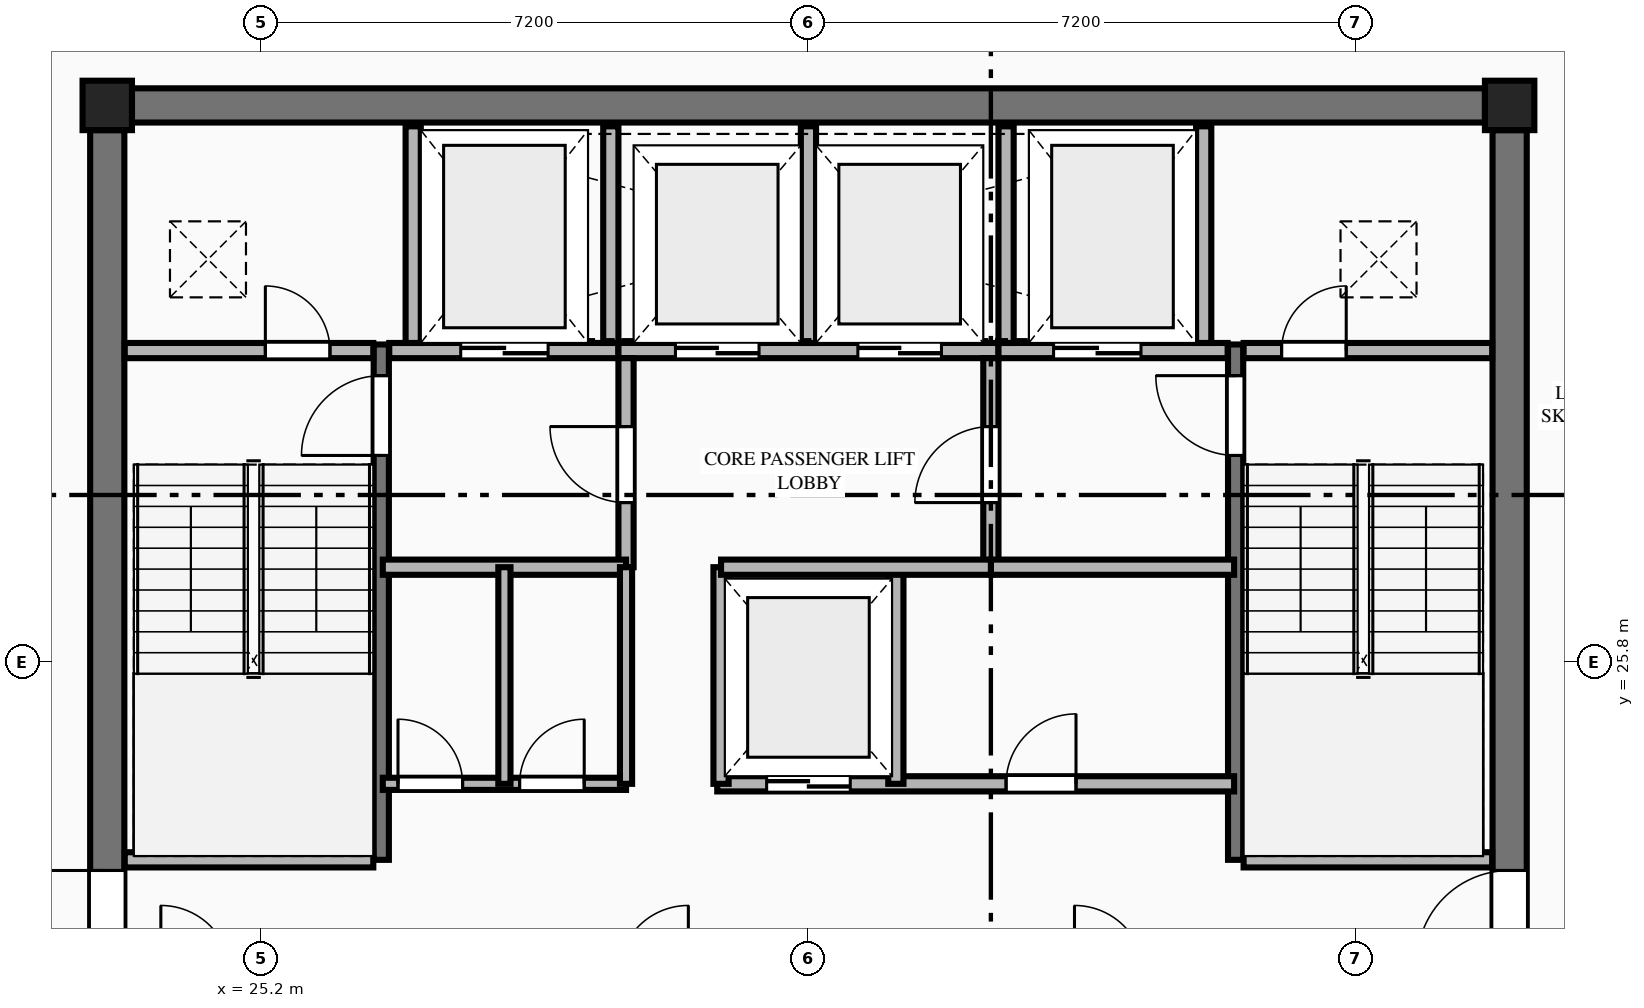
"""IFC4 building model, lengths in metres.
Left out: names, types, materials, properties, quantities, classifications, styles, units other than length and angle.
Written with IfcOpenShell. Run it as: python <this file> out.ifc"""

import sys

from ifc_helpers import new_model, si_unit, direction, frame, frame_2d, origin, origin_2d, place, context, subcontext, project, spatial, rectangle, extrude, element, fill, save


model = new_model("IFC4")
c1 = context("Model", 3, precision=1e-05, world=origin(), true_north=direction((0.0, 1.0)))
c2 = subcontext(c1, "Body", "Model", "MODEL_VIEW")
j1 = project(units=[si_unit("LENGTHUNIT", "METRE"), si_unit("PLANEANGLEUNIT", "RADIAN")], contexts=[c1])
p1 = place(None, origin())
s1 = spatial("IfcSite", under=j1, at=p1, CompositionType="ELEMENT")
p2 = place(p1, origin())
s2 = spatial("IfcBuilding", under=s1, at=p2, CompositionType="ELEMENT")
p3 = place(p2, frame((0.0, 0.0, 237.95)))
s3 = spatial("IfcBuildingStorey", under=s2, at=p3, CompositionType="ELEMENT", Elevation=237.95)
for number, where, z_axis, x_axis in (
    (1, (41.625, 33.125, 0.0), (0.0, 0.0, 1.0), (1.0, 0.0, 0.0)),
    (2, (23.175, 33.125, 0.0), (0.0, 0.0, 1.0), (1.0, 0.0, 0.0)),
):
    element("IfcColumn", number, at=place(p3, frame(where, z_axis=z_axis, x_axis=x_axis)), inside=s3, PredefinedType="COLUMN", context=c2, shape_type="SweptSolid", body=[
        extrude(rectangle(XDim=0.65, YDim=0.65, at=origin_2d()), origin(), (0.0, 0.0, 1.0), 3.65),
    ])
p4 = place(p3, frame((23.5, 33.125, 0.0), z_axis=(0.0, 0.0, 1.0), x_axis=(1.0, 0.0, 0.0)))
e3 = element("IfcWall", 3, at=p4, inside=s3, PredefinedType="SHEAR", context=c2, shape_type="SweptSolid", body=[
    extrude(rectangle(XDim=17.8, YDim=0.45, at=frame_2d((8.9, 0.0))), origin(), (0.0, 0.0, 1.0), 3.45),
])
p5 = place(p3, frame((23.175, 19.0, 0.0), z_axis=(0.0, 0.0, 1.0), x_axis=(0.0, 1.0, 0.0)))
e4 = element("IfcWall", 4, at=p5, inside=s3, PredefinedType="SHEAR", context=c2, shape_type="SweptSolid", body=[
    extrude(rectangle(XDim=13.8, YDim=0.45, at=frame_2d((6.9, 0.0))), origin(), (0.0, 0.0, 1.0), 3.45),
])
p6 = place(p5, frame((2.84, 0.0, 0.0)))
e5 = element("IfcOpeningElement", 5, at=p6, cuts=e4, PredefinedType="OPENING", context=c2, shape_type="SweptSolid", body=[
    extrude(rectangle(XDim=1.22, YDim=2.25, at=frame_2d((0.61, 1.125))), frame((0.0, 0.235, 0.0), z_axis=(0.0, -1.0, 0.0), x_axis=(1.0, 0.0, 0.0)), (0.0, 0.0, 1.0), 0.47),
])
p7 = place(p3, frame((41.625, 19.0, 0.0), z_axis=(0.0, 0.0, 1.0), x_axis=(0.0, 1.0, 0.0)))
e6 = element("IfcWall", 6, at=p7, inside=s3, PredefinedType="SHEAR", context=c2, shape_type="SweptSolid", body=[
    extrude(rectangle(XDim=13.8, YDim=0.45, at=frame_2d((6.9, 0.0))), origin(), (0.0, 0.0, 1.0), 3.45),
])
p8 = place(p7, frame((2.84, 0.0, 0.0)))
e7 = element("IfcOpeningElement", 7, at=p8, cuts=e6, PredefinedType="OPENING", context=c2, shape_type="SweptSolid", body=[
    extrude(rectangle(XDim=1.22, YDim=2.25, at=frame_2d((0.61, 1.125))), frame((0.0, 0.235, 0.0), z_axis=(0.0, -1.0, 0.0), x_axis=(1.0, 0.0, 0.0)), (0.0, 0.0, 1.0), 0.47),
])
p9 = place(p3, frame((26.78, 23.2, 0.0), z_axis=(0.0, 0.0, 1.0), x_axis=(0.0, 1.0, 0.0)))
e8 = element("IfcWall", 8, at=p9, inside=s3, PredefinedType="SHEAR", context=c2, shape_type="SweptSolid", body=[
    extrude(rectangle(XDim=6.78, YDim=0.2, at=frame_2d((3.39, 0.0))), origin(), (0.0, 0.0, 1.0), 3.65),
])
p10 = place(p9, frame((5.32, 0.0, 0.0)))
e9 = element("IfcOpeningElement", 9, at=p10, cuts=e8, PredefinedType="OPENING", context=c2, shape_type="SweptSolid", body=[
    extrude(rectangle(XDim=1.05, YDim=2.15, at=frame_2d((0.525, 1.075))), frame((0.0, 0.11, 0.0), z_axis=(0.0, -1.0, 0.0), x_axis=(1.0, 0.0, 0.0)), (0.0, 0.0, 1.0), 0.22),
])
p11 = place(p3, frame((23.405, 23.2, 0.0), z_axis=(0.0, 0.0, 1.0), x_axis=(1.0, 0.0, 0.0)))
e10 = element("IfcWall", 10, at=p11, inside=s3, PredefinedType="PLUMBINGWALL", context=c2, shape_type="SweptSolid", body=[
    extrude(rectangle(XDim=3.27, YDim=0.2, at=frame_2d((1.635, 0.0))), origin(), (0.0, 0.0, 1.0), 3.45),
])
p12 = place(p3, frame((38.02, 23.2, 0.0), z_axis=(0.0, 0.0, 1.0), x_axis=(0.0, 1.0, 0.0)))
e11 = element("IfcWall", 11, at=p12, inside=s3, PredefinedType="SHEAR", context=c2, shape_type="SweptSolid", body=[
    extrude(rectangle(XDim=6.78, YDim=0.2, at=frame_2d((3.39, 0.0))), origin(), (0.0, 0.0, 1.0), 3.65),
])
p13 = place(p12, frame((5.32, 0.0, 0.0)))
e12 = element("IfcOpeningElement", 12, at=p13, cuts=e11, PredefinedType="OPENING", context=c2, shape_type="SweptSolid", body=[
    extrude(rectangle(XDim=1.05, YDim=2.15, at=frame_2d((0.525, 1.075))), frame((0.0, 0.11, 0.0), z_axis=(0.0, -1.0, 0.0), x_axis=(1.0, 0.0, 0.0)), (0.0, 0.0, 1.0), 0.22),
])
p14 = place(p3, frame((38.125, 23.2, 0.0), z_axis=(0.0, 0.0, 1.0), x_axis=(1.0, 0.0, 0.0)))
e13 = element("IfcWall", 13, at=p14, inside=s3, PredefinedType="PLUMBINGWALL", context=c2, shape_type="SweptSolid", body=[
    extrude(rectangle(XDim=3.27, YDim=0.2, at=frame_2d((1.635, 0.0))), origin(), (0.0, 0.0, 1.0), 3.45),
])
p15 = place(p3, frame((23.405, 29.9, 0.0), z_axis=(0.0, 0.0, 1.0), x_axis=(1.0, 0.0, 0.0)))
e14 = element("IfcWall", 14, at=p15, inside=s3, PredefinedType="PLUMBINGWALL", context=c2, shape_type="SweptSolid", body=[
    extrude(rectangle(XDim=3.27, YDim=0.2, at=frame_2d((1.635, 0.0))), origin(), (0.0, 0.0, 1.0), 3.45),
])
p16 = place(p15, frame((1.85, 0.0, 0.0)))
e15 = element("IfcOpeningElement", 15, at=p16, cuts=e14, PredefinedType="OPENING", context=c2, shape_type="SweptSolid", body=[
    extrude(rectangle(XDim=0.85, YDim=2.05, at=frame_2d((0.425, 1.025))), frame((0.0, 0.11, 0.0), z_axis=(0.0, -1.0, 0.0), x_axis=(1.0, 0.0, 0.0)), (0.0, 0.0, 1.0), 0.22),
])
p17 = place(p3, frame((26.885, 29.9, 0.0), z_axis=(0.0, 0.0, 1.0), x_axis=(1.0, 0.0, 0.0)))
e16 = element("IfcWall", 16, at=p17, inside=s3, PredefinedType="PLUMBINGWALL", context=c2, shape_type="SweptSolid", body=[
    extrude(rectangle(XDim=3.015, YDim=0.2, at=frame_2d((1.507, 0.0))), origin(), (0.0, 0.0, 1.0), 3.45),
])
p18 = place(p17, frame((0.94, 0.0, 0.0)))
e17 = element("IfcOpeningElement", 17, at=p18, cuts=e16, PredefinedType="OPENING", context=c2, shape_type="SweptSolid", body=[
    extrude(rectangle(XDim=1.15, YDim=2.2, at=frame_2d((0.575, 1.1))), frame((0.0, 0.11, 0.0), z_axis=(0.0, -1.0, 0.0), x_axis=(1.0, 0.0, 0.0)), (0.0, 0.0, 1.0), 0.22),
])
p19 = place(p3, frame((29.9, 29.9, 0.0), z_axis=(0.0, 0.0, 1.0), x_axis=(1.0, 0.0, 0.0)))
e18 = element("IfcWall", 18, at=p19, inside=s3, PredefinedType="PLUMBINGWALL", context=c2, shape_type="SweptSolid", body=[
    extrude(rectangle(XDim=5.0, YDim=0.2, at=frame_2d((2.5, 0.0))), origin(), (0.0, 0.0, 1.0), 3.45),
])
p20 = place(p19, frame((0.75, 0.0, 0.0)))
e19 = element("IfcOpeningElement", 19, at=p20, cuts=e18, PredefinedType="OPENING", context=c2, shape_type="SweptSolid", body=[
    extrude(rectangle(XDim=1.1, YDim=2.2, at=frame_2d((0.55, 1.1))), frame((0.0, 0.11, 0.0), z_axis=(0.0, -1.0, 0.0), x_axis=(1.0, 0.0, 0.0)), (0.0, 0.0, 1.0), 0.22),
])
p21 = place(p19, frame((3.15, 0.0, 0.0)))
e20 = element("IfcOpeningElement", 20, at=p21, cuts=e18, PredefinedType="OPENING", context=c2, shape_type="SweptSolid", body=[
    extrude(rectangle(XDim=1.1, YDim=2.2, at=frame_2d((0.55, 1.1))), frame((0.0, 0.11, 0.0), z_axis=(0.0, -1.0, 0.0), x_axis=(1.0, 0.0, 0.0)), (0.0, 0.0, 1.0), 0.22),
])
p22 = place(p3, frame((34.9, 29.9, 0.0), z_axis=(0.0, 0.0, 1.0), x_axis=(1.0, 0.0, 0.0)))
e21 = element("IfcWall", 21, at=p22, inside=s3, PredefinedType="PLUMBINGWALL", context=c2, shape_type="SweptSolid", body=[
    extrude(rectangle(XDim=3.015, YDim=0.2, at=frame_2d((1.508, 0.0))), origin(), (0.0, 0.0, 1.0), 3.45),
])
p23 = place(p22, frame((0.725, 0.0, 0.0)))
e22 = element("IfcOpeningElement", 22, at=p23, cuts=e21, PredefinedType="OPENING", context=c2, shape_type="SweptSolid", body=[
    extrude(rectangle(XDim=1.15, YDim=2.2, at=frame_2d((0.575, 1.1))), frame((0.0, 0.11, 0.0), z_axis=(0.0, -1.0, 0.0), x_axis=(1.0, 0.0, 0.0)), (0.0, 0.0, 1.0), 0.22),
])
p24 = place(p3, frame((38.125, 29.9, 0.0), z_axis=(0.0, 0.0, 1.0), x_axis=(1.0, 0.0, 0.0)))
e23 = element("IfcWall", 23, at=p24, inside=s3, PredefinedType="PLUMBINGWALL", context=c2, shape_type="SweptSolid", body=[
    extrude(rectangle(XDim=3.27, YDim=0.2, at=frame_2d((1.635, 0.0))), origin(), (0.0, 0.0, 1.0), 3.45),
])
p25 = place(p24, frame((0.5, 0.0, 0.0)))
e24 = element("IfcOpeningElement", 24, at=p25, cuts=e23, PredefinedType="OPENING", context=c2, shape_type="SweptSolid", body=[
    extrude(rectangle(XDim=0.85, YDim=2.05, at=frame_2d((0.425, 1.025))), frame((0.0, 0.11, 0.0), z_axis=(0.0, -1.0, 0.0), x_axis=(1.0, 0.0, 0.0)), (0.0, 0.0, 1.0), 0.22),
])
for number, where, z_axis, x_axis in (
    (25, (27.2, 30.0, 0.0), (0.0, 0.0, 1.0), (0.0, 1.0, 0.0)),
    (26, (29.8, 30.0, 0.0), (0.0, 0.0, 1.0), (0.0, 1.0, 0.0)),
    (27, (32.4, 30.0, 0.0), (0.0, 0.0, 1.0), (0.0, 1.0, 0.0)),
    (28, (35.0, 30.0, 0.0), (0.0, 0.0, 1.0), (0.0, 1.0, 0.0)),
    (29, (37.6, 30.0, 0.0), (0.0, 0.0, 1.0), (0.0, 1.0, 0.0)),
):
    element("IfcWall", number, at=place(p3, frame(where, z_axis=z_axis, x_axis=x_axis)), inside=s3, PredefinedType="PLUMBINGWALL", context=c2, shape_type="SweptSolid", body=[
        extrude(rectangle(XDim=2.85, YDim=0.2, at=frame_2d((1.425, 0.0))), origin(), (0.0, 0.0, 1.0), 3.45),
    ])
p26 = place(p3, frame((30.0, 27.05, 0.0), z_axis=(0.0, 0.0, 1.0), x_axis=(0.0, 1.0, 0.0)))
e30 = element("IfcWall", 30, at=p26, inside=s3, PredefinedType="PLUMBINGWALL", context=c2, shape_type="SweptSolid", body=[
    extrude(rectangle(XDim=2.75, YDim=0.2, at=frame_2d((1.375, 0.0))), origin(), (0.0, 0.0, 1.0), 3.45),
])
p27 = place(p26, frame((0.85, 0.0, 0.0)))
e31 = element("IfcOpeningElement", 31, at=p27, cuts=e30, PredefinedType="OPENING", context=c2, shape_type="SweptSolid", body=[
    extrude(rectangle(XDim=1.0, YDim=2.15, at=frame_2d((0.5, 1.075))), frame((0.0, 0.11, 0.0), z_axis=(0.0, -1.0, 0.0), x_axis=(1.0, 0.0, 0.0)), (0.0, 0.0, 1.0), 0.22),
])
p28 = place(p3, frame((26.8, 27.05, 0.0), z_axis=(0.0, 0.0, 1.0), x_axis=(1.0, 0.0, 0.0)))
e32 = element("IfcWall", 32, at=p28, inside=s3, PredefinedType="PLUMBINGWALL", context=c2, shape_type="SweptSolid", body=[
    extrude(rectangle(XDim=3.2, YDim=0.2, at=frame_2d((1.6, 0.0))), origin(), (0.0, 0.0, 1.0), 3.45),
])
p29 = place(p3, frame((34.8, 27.05, 0.0), z_axis=(0.0, 0.0, 1.0), x_axis=(0.0, 1.0, 0.0)))
e33 = element("IfcWall", 33, at=p29, inside=s3, PredefinedType="PLUMBINGWALL", context=c2, shape_type="SweptSolid", body=[
    extrude(rectangle(XDim=2.75, YDim=0.2, at=frame_2d((1.375, 0.0))), origin(), (0.0, 0.0, 1.0), 3.45),
])
p30 = place(p29, frame((0.85, 0.0, 0.0)))
e34 = element("IfcOpeningElement", 34, at=p30, cuts=e33, PredefinedType="OPENING", context=c2, shape_type="SweptSolid", body=[
    extrude(rectangle(XDim=1.0, YDim=2.15, at=frame_2d((0.5, 1.075))), frame((0.0, 0.11, 0.0), z_axis=(0.0, -1.0, 0.0), x_axis=(1.0, 0.0, 0.0)), (0.0, 0.0, 1.0), 0.22),
])
p31 = place(p3, frame((34.8, 27.05, 0.0), z_axis=(0.0, 0.0, 1.0), x_axis=(1.0, 0.0, 0.0)))
e35 = element("IfcWall", 35, at=p31, inside=s3, PredefinedType="PLUMBINGWALL", context=c2, shape_type="SweptSolid", body=[
    extrude(rectangle(XDim=3.2, YDim=0.2, at=frame_2d((1.6, 0.0))), origin(), (0.0, 0.0, 1.0), 3.45),
])
p32 = place(p3, frame((26.8, 24.2, 0.0), z_axis=(0.0, 0.0, 1.0), x_axis=(1.0, 0.0, 0.0)))
e36 = element("IfcWall", 36, at=p32, inside=s3, PredefinedType="PARTITIONING", context=c2, shape_type="SweptSolid", body=[
    extrude(rectangle(XDim=3.2, YDim=0.16, at=frame_2d((1.6, 0.0))), origin(), (0.0, 0.0, 1.0), 3.45),
])
p33 = place(p32, frame((0.2, 0.0, 0.0)))
e37 = element("IfcOpeningElement", 37, at=p33, cuts=e36, PredefinedType="OPENING", context=c2, shape_type="SweptSolid", body=[
    extrude(rectangle(XDim=0.85, YDim=2.05, at=frame_2d((0.425, 1.025))), frame((0.0, 0.09, 0.0), z_axis=(0.0, -1.0, 0.0), x_axis=(1.0, 0.0, 0.0)), (0.0, 0.0, 1.0), 0.18),
])
p34 = place(p32, frame((1.8, 0.0, 0.0)))
e38 = element("IfcOpeningElement", 38, at=p34, cuts=e36, PredefinedType="OPENING", context=c2, shape_type="SweptSolid", body=[
    extrude(rectangle(XDim=0.85, YDim=2.05, at=frame_2d((0.425, 1.025))), frame((0.0, 0.09, 0.0), z_axis=(0.0, -1.0, 0.0), x_axis=(1.0, 0.0, 0.0)), (0.0, 0.0, 1.0), 0.18),
])
p35 = place(p3, frame((30.0, 24.2, 0.0), z_axis=(0.0, 0.0, 1.0), x_axis=(0.0, 1.0, 0.0)))
e39 = element("IfcWall", 39, at=p35, inside=s3, PredefinedType="PARTITIONING", context=c2, shape_type="SweptSolid", body=[
    extrude(rectangle(XDim=2.85, YDim=0.16, at=frame_2d((1.425, 0.0))), origin(), (0.0, 0.0, 1.0), 3.45),
])
p36 = place(p3, frame((31.2, 24.2, 0.0), z_axis=(0.0, 0.0, 1.0), x_axis=(1.0, 0.0, 0.0)))
e40 = element("IfcWall", 40, at=p36, inside=s3, PredefinedType="PLUMBINGWALL", context=c2, shape_type="SweptSolid", body=[
    extrude(rectangle(XDim=6.8, YDim=0.2, at=frame_2d((3.4, 0.0))), origin(), (0.0, 0.0, 1.0), 3.45),
])
p37 = place(p36, frame((0.65, 0.0, 0.0)))
e41 = element("IfcOpeningElement", 41, at=p37, cuts=e40, PredefinedType="OPENING", context=c2, shape_type="SweptSolid", body=[
    extrude(rectangle(XDim=1.1, YDim=2.2, at=frame_2d((0.55, 1.1))), frame((0.0, 0.11, 0.0), z_axis=(0.0, -1.0, 0.0), x_axis=(1.0, 0.0, 0.0)), (0.0, 0.0, 1.0), 0.22),
])
p38 = place(p36, frame((3.8, 0.0, 0.0)))
e42 = element("IfcOpeningElement", 42, at=p38, cuts=e40, PredefinedType="OPENING", context=c2, shape_type="SweptSolid", body=[
    extrude(rectangle(XDim=0.92, YDim=2.15, at=frame_2d((0.46, 1.075))), frame((0.0, 0.11, 0.0), z_axis=(0.0, -1.0, 0.0), x_axis=(1.0, 0.0, 0.0)), (0.0, 0.0, 1.0), 0.22),
])
for number, where, z_axis, x_axis in (
    (43, (31.25, 24.2, 0.0), (0.0, 0.0, 1.0), (0.0, 1.0, 0.0)),
    (44, (33.55, 24.2, 0.0), (0.0, 0.0, 1.0), (0.0, 1.0, 0.0)),
):
    element("IfcWall", number, at=place(p3, frame(where, z_axis=z_axis, x_axis=x_axis)), inside=s3, PredefinedType="PLUMBINGWALL", context=c2, shape_type="SweptSolid", body=[
        extrude(rectangle(XDim=2.85, YDim=0.2, at=frame_2d((1.425, 0.0))), origin(), (0.0, 0.0, 1.0), 3.45),
    ])
p39 = place(p3, frame((31.25, 27.05, 0.0), z_axis=(0.0, 0.0, 1.0), x_axis=(1.0, 0.0, 0.0)))
e45 = element("IfcWall", 45, at=p39, inside=s3, PredefinedType="PLUMBINGWALL", context=c2, shape_type="SweptSolid", body=[
    extrude(rectangle(XDim=3.55, YDim=0.2, at=frame_2d((1.775, 0.0))), origin(), (0.0, 0.0, 1.0), 3.45),
])
p40 = place(p3, frame((28.4, 24.2, 0.0), z_axis=(0.0, 0.0, 1.0), x_axis=(0.0, 1.0, 0.0)))
e46 = element("IfcWall", 46, at=p40, inside=s3, PredefinedType="PARTITIONING", context=c2, shape_type="SweptSolid", body=[
    extrude(rectangle(XDim=2.85, YDim=0.16, at=frame_2d((1.425, 0.0))), origin(), (0.0, 0.0, 1.0), 3.45),
])
p41 = place(p6, origin())
e47 = element("IfcDoor", 47, at=p41, inside=s3, OperationType="SINGLE_SWING_RIGHT", PredefinedType="DOOR", context=c2, shape_type="SweptSolid", body=[
    extrude(rectangle(XDim=1.22, YDim=2.25, at=frame_2d((0.61, 1.125))), frame((0.0, 0.025, 0.0), z_axis=(0.0, -1.0, 0.0), x_axis=(1.0, 0.0, 0.0)), (0.0, 0.0, 1.0), 0.05),
])
fill(e5, e47)
p42 = place(p8, origin())
e48 = element("IfcDoor", 48, at=p42, inside=s3, OperationType="SINGLE_SWING_LEFT", PredefinedType="DOOR", context=c2, shape_type="SweptSolid", body=[
    extrude(rectangle(XDim=1.22, YDim=2.25, at=frame_2d((0.61, 1.125))), frame((0.0, 0.025, 0.0), z_axis=(0.0, -1.0, 0.0), x_axis=(1.0, 0.0, 0.0)), (0.0, 0.0, 1.0), 0.05),
])
fill(e7, e48)
p43 = place(p10, origin())
e49 = element("IfcDoor", 49, at=p43, inside=s3, OperationType="SINGLE_SWING_LEFT", PredefinedType="DOOR", context=c2, shape_type="SweptSolid", body=[
    extrude(rectangle(XDim=1.05, YDim=2.15, at=frame_2d((0.525, 1.075))), frame((0.0, 0.025, 0.0), z_axis=(0.0, -1.0, 0.0), x_axis=(1.0, 0.0, 0.0)), (0.0, 0.0, 1.0), 0.05),
])
fill(e9, e49)
p44 = place(p13, origin())
e50 = element("IfcDoor", 50, at=p44, inside=s3, OperationType="SINGLE_SWING_RIGHT", PredefinedType="DOOR", context=c2, shape_type="SweptSolid", body=[
    extrude(rectangle(XDim=1.05, YDim=2.15, at=frame_2d((0.525, 1.075))), frame((0.0, 0.025, 0.0), z_axis=(0.0, -1.0, 0.0), x_axis=(1.0, 0.0, 0.0)), (0.0, 0.0, 1.0), 0.05),
])
fill(e12, e50)
p45 = place(p16, origin())
e51 = element("IfcDoor", 51, at=p45, inside=s3, OperationType="SINGLE_SWING_LEFT", PredefinedType="DOOR", context=c2, shape_type="SweptSolid", body=[
    extrude(rectangle(XDim=0.85, YDim=2.05, at=frame_2d((0.425, 1.025))), frame((0.0, 0.025, 0.0), z_axis=(0.0, -1.0, 0.0), x_axis=(1.0, 0.0, 0.0)), (0.0, 0.0, 1.0), 0.05),
])
fill(e15, e51)
p46 = place(p25, origin())
e52 = element("IfcDoor", 52, at=p46, inside=s3, OperationType="SINGLE_SWING_RIGHT", PredefinedType="DOOR", context=c2, shape_type="SweptSolid", body=[
    extrude(rectangle(XDim=0.85, YDim=2.05, at=frame_2d((0.425, 1.025))), frame((0.0, 0.025, 0.0), z_axis=(0.0, -1.0, 0.0), x_axis=(1.0, 0.0, 0.0)), (0.0, 0.0, 1.0), 0.05),
])
fill(e24, e52)
p47 = place(p18, origin())
e53 = element("IfcDoor", 53, at=p47, inside=s3, OperationType="DOUBLE_DOOR_SLIDING", PredefinedType="DOOR", context=c2, shape_type="SweptSolid", body=[
    extrude(rectangle(XDim=1.15, YDim=2.2, at=frame_2d((0.575, 1.1))), frame((0.0, 0.025, 0.0), z_axis=(0.0, -1.0, 0.0), x_axis=(1.0, 0.0, 0.0)), (0.0, 0.0, 1.0), 0.05),
])
fill(e17, e53)
p48 = place(p23, origin())
e54 = element("IfcDoor", 54, at=p48, inside=s3, OperationType="DOUBLE_DOOR_SLIDING", PredefinedType="DOOR", context=c2, shape_type="SweptSolid", body=[
    extrude(rectangle(XDim=1.15, YDim=2.2, at=frame_2d((0.575, 1.1))), frame((0.0, 0.025, 0.0), z_axis=(0.0, -1.0, 0.0), x_axis=(1.0, 0.0, 0.0)), (0.0, 0.0, 1.0), 0.05),
])
fill(e22, e54)
p49 = place(p20, origin())
e55 = element("IfcDoor", 55, at=p49, inside=s3, OperationType="DOUBLE_DOOR_SLIDING", PredefinedType="DOOR", context=c2, shape_type="SweptSolid", body=[
    extrude(rectangle(XDim=1.1, YDim=2.2, at=frame_2d((0.55, 1.1))), frame((0.0, 0.025, 0.0), z_axis=(0.0, -1.0, 0.0), x_axis=(1.0, 0.0, 0.0)), (0.0, 0.0, 1.0), 0.05),
])
fill(e19, e55)
p50 = place(p21, origin())
e56 = element("IfcDoor", 56, at=p50, inside=s3, OperationType="DOUBLE_DOOR_SLIDING", PredefinedType="DOOR", context=c2, shape_type="SweptSolid", body=[
    extrude(rectangle(XDim=1.1, YDim=2.2, at=frame_2d((0.55, 1.1))), frame((0.0, 0.025, 0.0), z_axis=(0.0, -1.0, 0.0), x_axis=(1.0, 0.0, 0.0)), (0.0, 0.0, 1.0), 0.05),
])
fill(e20, e56)
p51 = place(p27, origin())
e57 = element("IfcDoor", 57, at=p51, inside=s3, OperationType="SINGLE_SWING_RIGHT", PredefinedType="DOOR", context=c2, shape_type="SweptSolid", body=[
    extrude(rectangle(XDim=1.0, YDim=2.15, at=frame_2d((0.5, 1.075))), frame((0.0, 0.025, 0.0), z_axis=(0.0, -1.0, 0.0), x_axis=(1.0, 0.0, 0.0)), (0.0, 0.0, 1.0), 0.05),
])
fill(e31, e57)
p52 = place(p30, origin())
e58 = element("IfcDoor", 58, at=p52, inside=s3, OperationType="SINGLE_SWING_LEFT", PredefinedType="DOOR", context=c2, shape_type="SweptSolid", body=[
    extrude(rectangle(XDim=1.0, YDim=2.15, at=frame_2d((0.5, 1.075))), frame((0.0, 0.025, 0.0), z_axis=(0.0, -1.0, 0.0), x_axis=(1.0, 0.0, 0.0)), (0.0, 0.0, 1.0), 0.05),
])
fill(e34, e58)
p53 = place(p37, origin())
e59 = element("IfcDoor", 59, at=p53, inside=s3, OperationType="DOUBLE_DOOR_SLIDING", PredefinedType="DOOR", context=c2, shape_type="SweptSolid", body=[
    extrude(rectangle(XDim=1.1, YDim=2.2, at=frame_2d((0.55, 1.1))), frame((0.0, 0.025, 0.0), z_axis=(0.0, -1.0, 0.0), x_axis=(1.0, 0.0, 0.0)), (0.0, 0.0, 1.0), 0.05),
])
fill(e41, e59)
p54 = place(p33, origin())
e60 = element("IfcDoor", 60, at=p54, inside=s3, OperationType="SINGLE_SWING_LEFT", PredefinedType="DOOR", context=c2, shape_type="SweptSolid", body=[
    extrude(rectangle(XDim=0.85, YDim=2.05, at=frame_2d((0.425, 1.025))), frame((0.0, 0.025, 0.0), z_axis=(0.0, -1.0, 0.0), x_axis=(1.0, 0.0, 0.0)), (0.0, 0.0, 1.0), 0.05),
])
fill(e37, e60)
p55 = place(p34, origin())
e61 = element("IfcDoor", 61, at=p55, inside=s3, OperationType="SINGLE_SWING_RIGHT", PredefinedType="DOOR", context=c2, shape_type="SweptSolid", body=[
    extrude(rectangle(XDim=0.85, YDim=2.05, at=frame_2d((0.425, 1.025))), frame((0.0, 0.025, 0.0), z_axis=(0.0, -1.0, 0.0), x_axis=(1.0, 0.0, 0.0)), (0.0, 0.0, 1.0), 0.05),
])
fill(e38, e61)
p56 = place(p38, origin())
e62 = element("IfcDoor", 62, at=p56, inside=s3, OperationType="SINGLE_SWING_RIGHT", PredefinedType="DOOR", context=c2, shape_type="SweptSolid", body=[
    extrude(rectangle(XDim=0.92, YDim=2.15, at=frame_2d((0.46, 1.075))), frame((0.0, 0.025, 0.0), z_axis=(0.0, -1.0, 0.0), x_axis=(1.0, 0.0, 0.0)), (0.0, 0.0, 1.0), 0.05),
])
fill(e42, e62)
save(model, sys.argv[1])
